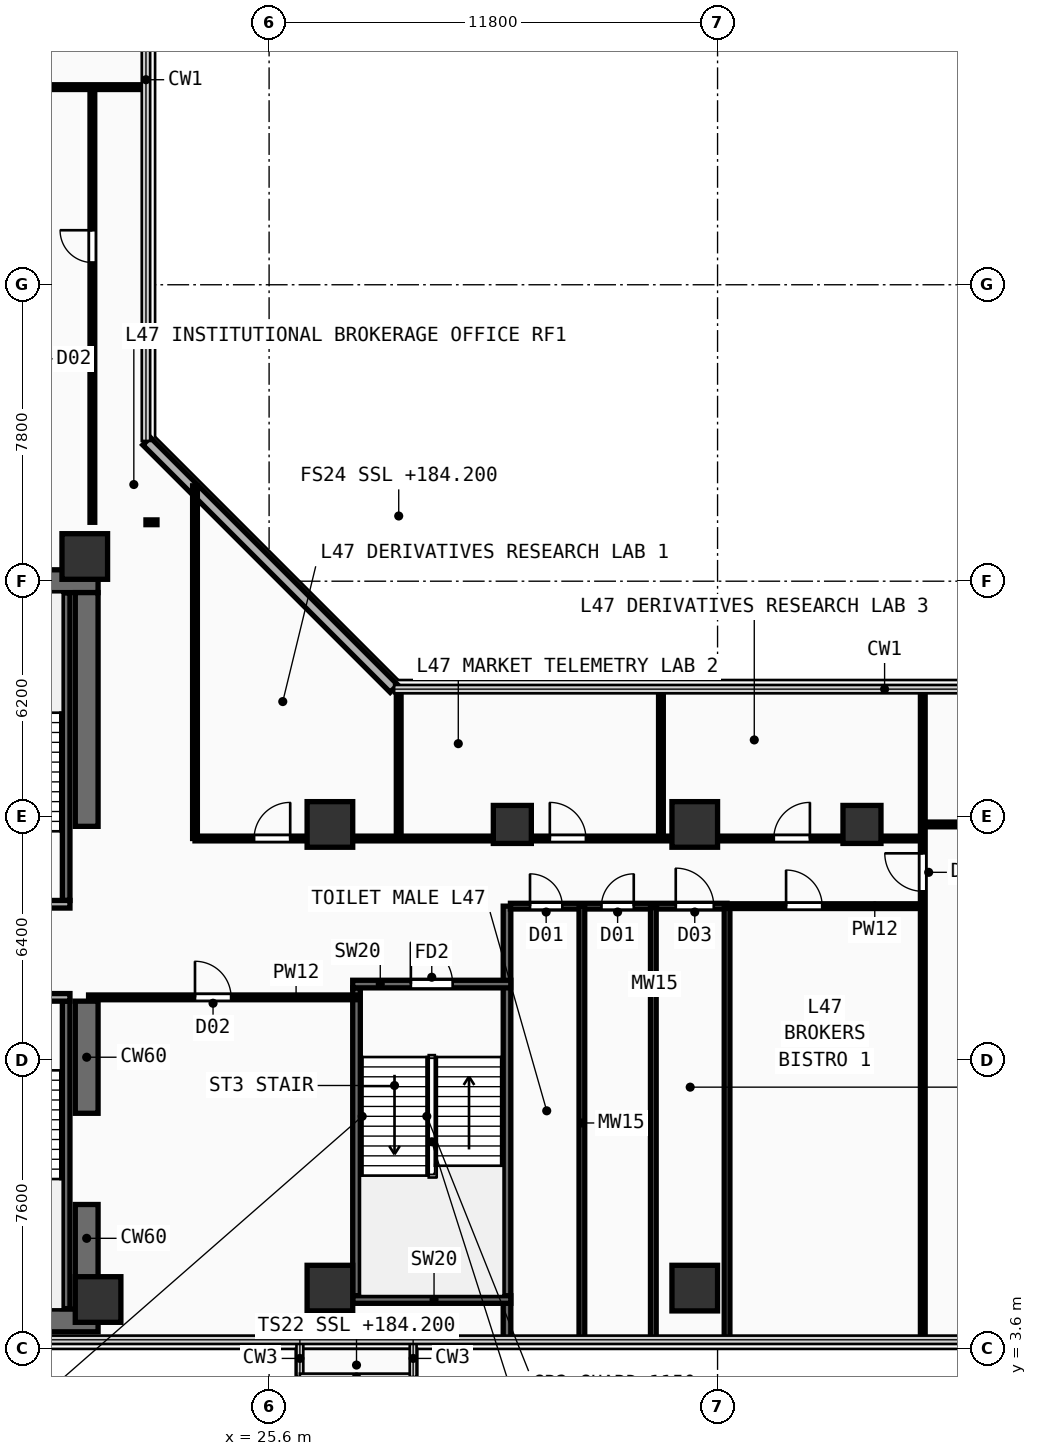
"""IFC4 building model, lengths in metres.
Left out: names, types, materials, properties, quantities, classifications, styles, units other than length and angle.
Written with IfcOpenShell. Run it as: python <this file> out.ifc"""

import sys

from ifc_helpers import new_model, si_unit, direction, frame, frame_2d, origin, origin_2d, place, context, subcontext, project, spatial, rectangle, extrude, element, fill, save


model = new_model("IFC4")
c1 = context("Model", 3, precision=1e-05, world=origin(), true_north=direction((0.0, 1.0)))
c2 = subcontext(c1, "Body", "Model", "MODEL_VIEW")
j1 = project(units=[si_unit("LENGTHUNIT", "METRE"), si_unit("PLANEANGLEUNIT", "RADIAN")], contexts=[c1])
p1 = place(None, origin())
s1 = spatial("IfcSite", under=j1, at=p1, CompositionType="ELEMENT")
p2 = place(p1, origin())
s2 = spatial("IfcBuilding", under=s1, at=p2, CompositionType="ELEMENT")
p3 = place(p2, frame((0.0, 0.0, 184.2)))
s3 = spatial("IfcBuildingStorey", under=s2, at=p3, CompositionType="ELEMENT", Elevation=184.2)
for number, where, z_axis, x_axis in (
    (1, (7.15, 4.35, 0.0), (0.0, 0.0, 1.0), (1.0, 0.0, 0.0)),
    (2, (7.15, 23.8, 0.0), (0.0, 0.0, 1.0), (1.0, 0.0, 0.0)),
):
    element("IfcWall", number, at=place(p3, frame(where, z_axis=z_axis, x_axis=x_axis)), inside=s3, PredefinedType="SHEAR", context=c2, shape_type="SweptSolid", body=[
        extrude(rectangle(XDim=13.95, YDim=0.6, at=frame_2d((6.975, 0.0))), origin(), (0.0, 0.0, 1.0), 3.56),
    ])
p4 = place(p3, frame((20.8, 4.65, 0.0), z_axis=(0.0, 0.0, 1.0), x_axis=(0.0, 1.0, 0.0)))
e3 = element("IfcWall", 3, at=p4, inside=s3, PredefinedType="SHEAR", context=c2, shape_type="SweptSolid", body=[
    extrude(rectangle(XDim=2.75, YDim=0.6, at=frame_2d((1.375, 0.0))), origin(), (0.0, 0.0, 1.0), 3.56),
])
p5 = place(p3, frame((20.8, 9.8, 0.0), z_axis=(0.0, 0.0, 1.0), x_axis=(0.0, 1.0, 0.0)))
e4 = element("IfcWall", 4, at=p5, inside=s3, PredefinedType="SHEAR", context=c2, shape_type="SweptSolid", body=[
    extrude(rectangle(XDim=2.95, YDim=0.6, at=frame_2d((1.475, 0.0))), origin(), (0.0, 0.0, 1.0), 3.56),
])
p6 = place(p3, frame((20.8, 17.35, 0.0), z_axis=(0.0, 0.0, 1.0), x_axis=(0.0, 1.0, 0.0)))
e5 = element("IfcWall", 5, at=p6, inside=s3, PredefinedType="SHEAR", context=c2, shape_type="SweptSolid", body=[
    extrude(rectangle(XDim=6.15, YDim=0.6, at=frame_2d((3.075, 0.0))), origin(), (0.0, 0.0, 1.0), 3.56),
])
for number, where, z_axis, x_axis in (
    (6, (21.1, 4.9, 0.0), (0.0, 0.0, 1.0), (1.0, 0.0, 0.0)),
    (7, (20.75, 24.45, 0.0), (0.0, 0.0, 1.0), (1.0, 0.0, 0.0)),
    (8, (27.2, 5.2, 0.0), (0.0, 0.0, 1.0), (1.0, 0.0, 0.0)),
    (9, (36.8, 5.2, 0.0), (0.0, 0.0, 1.0), (1.0, 0.0, 0.0)),
    (10, (27.2, 17.4, 0.0), (0.0, 0.0, 1.0), (1.0, 0.0, 0.0)),
    (11, (36.8, 17.4, 0.0), (0.0, 0.0, 1.0), (1.0, 0.0, 0.0)),
):
    element("IfcColumn", number, at=place(p3, frame(where, z_axis=z_axis, x_axis=x_axis)), inside=s3, PredefinedType="COLUMN", context=c2, shape_type="SweptSolid", body=[
        extrude(rectangle(XDim=1.2, YDim=1.2, at=origin_2d()), origin(), (0.0, 0.0, 1.0), 3.56),
    ])
for number, where, z_axis, x_axis in (
    (12, (32.0, 17.4, 0.0), (0.0, 0.0, 1.0), (1.0, 0.0, 0.0)),
    (13, (41.2, 17.4, 0.0), (0.0, 0.0, 1.0), (1.0, 0.0, 0.0)),
):
    element("IfcColumn", number, at=place(p3, frame(where, z_axis=z_axis, x_axis=x_axis)), inside=s3, PredefinedType="COLUMN", context=c2, shape_type="SweptSolid", body=[
        extrude(rectangle(XDim=1.0, YDim=1.0, at=origin_2d()), origin(), (0.0, 0.0, 1.0), 3.56),
    ])
p7 = place(p3, frame((28.885, 20.975, 0.0), z_axis=(0.0, 0.0, 1.0), x_axis=(-0.707106781187, 0.707106781187, 0.0)))
e14 = element("IfcWall", 14, at=p7, inside=s3, PredefinedType="SOLIDWALL", context=c2, shape_type="SweptSolid", body=[
    extrude(rectangle(XDim=9.207, YDim=0.28, at=frame_2d((4.603, 0.0))), origin(), (0.0, 0.0, 1.0), 3.56),
])
p8 = place(p3, frame((20.26, 4.66, 0.0), z_axis=(0.0, 0.0, 1.0), x_axis=(0.0, 1.0, 0.0)))
e15 = element("IfcWall", 15, at=p8, inside=s3, PredefinedType="SHEAR", context=c2, shape_type="SweptSolid", body=[
    extrude(rectangle(XDim=8.09, YDim=0.2, at=frame_2d((4.045, 0.0))), origin(), (0.0, 0.0, 1.0), 3.56),
])
p9 = place(p3, frame((16.4, 12.85, 0.0), z_axis=(0.0, 0.0, 1.0), x_axis=(1.0, 0.0, 0.0)))
e16 = element("IfcWall", 16, at=p9, inside=s3, PredefinedType="PARTITIONING", context=c2, shape_type="SweptSolid", body=[
    extrude(rectangle(XDim=3.96, YDim=0.2, at=frame_2d((1.98, 0.0))), origin(), (0.0, 0.0, 1.0), 3.56),
])
p10 = place(p9, frame((1.304, 0.0, 0.0)))
e17 = element("IfcOpeningElement", 17, at=p10, cuts=e16, PredefinedType="OPENING", context=c2, shape_type="SweptSolid", body=[
    extrude(rectangle(XDim=1.1, YDim=2.2, at=frame_2d((0.55, 1.1))), frame((0.0, 0.11, 0.0), z_axis=(0.0, -1.0, 0.0), x_axis=(1.0, 0.0, 0.0)), (0.0, 0.0, 1.0), 0.22),
])
p11 = place(p3, frame((20.26, 15.4, 0.0), z_axis=(0.0, 0.0, 1.0), x_axis=(0.0, 1.0, 0.0)))
e18 = element("IfcWall", 18, at=p11, inside=s3, PredefinedType="SHEAR", context=c2, shape_type="SweptSolid", body=[
    extrude(rectangle(XDim=8.09, YDim=0.2, at=frame_2d((4.045, 0.0))), origin(), (0.0, 0.0, 1.0), 3.56),
])
p12 = place(p3, frame((16.41, 15.3, 0.0), z_axis=(0.0, 0.0, 1.0), x_axis=(1.0, 0.0, 0.0)))
e19 = element("IfcWall", 19, at=p12, inside=s3, PredefinedType="PARTITIONING", context=c2, shape_type="SweptSolid", body=[
    extrude(rectangle(XDim=3.95, YDim=0.2, at=frame_2d((1.975, 0.0))), origin(), (0.0, 0.0, 1.0), 3.56),
])
p13 = place(p12, frame((1.294, 0.0, 0.0)))
e20 = element("IfcOpeningElement", 20, at=p13, cuts=e19, PredefinedType="OPENING", context=c2, shape_type="SweptSolid", body=[
    extrude(rectangle(XDim=1.1, YDim=2.2, at=frame_2d((0.55, 1.1))), frame((0.0, 0.11, 0.0), z_axis=(0.0, -1.0, 0.0), x_axis=(1.0, 0.0, 0.0)), (0.0, 0.0, 1.0), 0.22),
])
p14 = place(p3, frame((27.9, 5.0, 0.0), z_axis=(0.0, 0.0, 1.0), x_axis=(0.0, 1.0, 0.0)))
e21 = element("IfcWall", 21, at=p14, inside=s3, PredefinedType="SHEAR", context=c2, shape_type="SweptSolid", body=[
    extrude(rectangle(XDim=8.1, YDim=0.2, at=frame_2d((4.05, 0.0))), origin(), (0.0, 0.0, 1.0), 3.56),
])
p15 = place(p3, frame((31.86, 3.84, 0.0), z_axis=(0.0, 0.0, 1.0), x_axis=(0.0, 1.0, 0.0)))
e22 = element("IfcWall", 22, at=p15, inside=s3, PredefinedType="SHEAR", context=c2, shape_type="SweptSolid", body=[
    extrude(rectangle(XDim=11.41, YDim=0.2, at=frame_2d((5.705, 0.0))), origin(), (0.0, 0.0, 1.0), 3.56),
])
p16 = place(p3, frame((27.8, 4.9, 0.0), z_axis=(0.0, 0.0, 1.0), x_axis=(1.0, 0.0, 0.0)))
e23 = element("IfcWall", 23, at=p16, inside=s3, PredefinedType="SHEAR", context=c2, shape_type="SweptSolid", body=[
    extrude(rectangle(XDim=4.16, YDim=0.2, at=frame_2d((2.08, 0.0))), origin(), (0.0, 0.0, 1.0), 3.56),
])
p17 = place(p3, frame((27.8, 13.2, 0.0), z_axis=(0.0, 0.0, 1.0), x_axis=(1.0, 0.0, 0.0)))
e24 = element("IfcWall", 24, at=p17, inside=s3, PredefinedType="SHEAR", context=c2, shape_type="SweptSolid", body=[
    extrude(rectangle(XDim=4.16, YDim=0.2, at=frame_2d((2.08, 0.0))), origin(), (0.0, 0.0, 1.0), 3.56),
])
p18 = place(p17, frame((1.53, 0.0, 0.0)))
e25 = element("IfcOpeningElement", 25, at=p18, cuts=e24, PredefinedType="OPENING", context=c2, shape_type="SweptSolid", body=[
    extrude(rectangle(XDim=1.1, YDim=2.2, at=frame_2d((0.55, 1.1))), frame((0.0, 0.11, 0.0), z_axis=(0.0, -1.0, 0.0), x_axis=(1.0, 0.0, 0.0)), (0.0, 0.0, 1.0), 0.22),
])
p19 = place(p3, frame((31.95, 15.25, 0.0), z_axis=(0.0, 0.0, 1.0), x_axis=(1.0, 0.0, 0.0)))
e26 = element("IfcWall", 26, at=p19, inside=s3, PredefinedType="PLUMBINGWALL", context=c2, shape_type="SweptSolid", body=[
    extrude(rectangle(XDim=5.7, YDim=0.15, at=frame_2d((2.85, 0.0))), origin(), (0.0, 0.0, 1.0), 3.16),
])
p20 = place(p19, frame((0.515, 0.0, 0.0)))
e27 = element("IfcOpeningElement", 27, at=p20, cuts=e26, PredefinedType="OPENING", context=c2, shape_type="SweptSolid", body=[
    extrude(rectangle(XDim=0.85, YDim=2.15, at=frame_2d((0.425, 1.075))), frame((0.0, 0.085, 0.0), z_axis=(0.0, -1.0, 0.0), x_axis=(1.0, 0.0, 0.0)), (0.0, 0.0, 1.0), 0.17),
])
p21 = place(p19, frame((2.395, 0.0, 0.0)))
e28 = element("IfcOpeningElement", 28, at=p21, cuts=e26, PredefinedType="OPENING", context=c2, shape_type="SweptSolid", body=[
    extrude(rectangle(XDim=0.85, YDim=2.15, at=frame_2d((0.425, 1.075))), frame((0.0, 0.085, 0.0), z_axis=(0.0, -1.0, 0.0), x_axis=(1.0, 0.0, 0.0)), (0.0, 0.0, 1.0), 0.17),
])
p22 = place(p19, frame((4.35, 0.0, 0.0)))
e29 = element("IfcOpeningElement", 29, at=p22, cuts=e26, PredefinedType="OPENING", context=c2, shape_type="SweptSolid", body=[
    extrude(rectangle(XDim=1.0, YDim=2.2, at=frame_2d((0.5, 1.1))), frame((0.0, 0.085, 0.0), z_axis=(0.0, -1.0, 0.0), x_axis=(1.0, 0.0, 0.0)), (0.0, 0.0, 1.0), 0.17),
])
for number, where, z_axis, x_axis in (
    (30, (33.83, 3.84, 0.0), (0.0, 0.0, 1.0), (0.0, 1.0, 0.0)),
    (31, (35.71, 3.84, 0.0), (0.0, 0.0, 1.0), (0.0, 1.0, 0.0)),
    (32, (37.65, 3.84, 0.0), (0.0, 0.0, 1.0), (0.0, 1.0, 0.0)),
):
    element("IfcWall", number, at=place(p3, frame(where, z_axis=z_axis, x_axis=x_axis)), inside=s3, PredefinedType="PLUMBINGWALL", context=c2, shape_type="SweptSolid", body=[
        extrude(rectangle(XDim=11.41, YDim=0.15, at=frame_2d((5.705, 0.0))), origin(), (0.0, 0.0, 1.0), 3.56),
    ])
p23 = place(p3, frame((20.85, 12.85, 0.0), z_axis=(0.0, 0.0, 1.0), x_axis=(1.0, 0.0, 0.0)))
e33 = element("IfcWall", 33, at=p23, inside=s3, PredefinedType="PARTITIONING", context=c2, shape_type="SweptSolid", body=[
    extrude(rectangle(XDim=7.05, YDim=0.125, at=frame_2d((3.525, 0.0))), origin(), (0.0, 0.0, 1.0), 3.56),
])
p24 = place(p23, frame((2.8, 0.0, 0.0)))
e34 = element("IfcOpeningElement", 34, at=p24, cuts=e33, PredefinedType="OPENING", context=c2, shape_type="SweptSolid", body=[
    extrude(rectangle(XDim=0.95, YDim=2.15, at=frame_2d((0.475, 1.075))), frame((0.0, 0.073, 0.0), z_axis=(0.0, -1.0, 0.0), x_axis=(1.0, 0.0, 0.0)), (0.0, 0.0, 1.0), 0.145),
])
p25 = place(p3, frame((20.95, 25.35, 0.0), z_axis=(0.0, 0.0, 1.0), x_axis=(0.0, 1.0, 0.0)))
e35 = element("IfcWall", 35, at=p25, inside=s3, PredefinedType="PARTITIONING", context=c2, shape_type="SweptSolid", body=[
    extrude(rectangle(XDim=11.45, YDim=0.125, at=frame_2d((5.725, 0.0))), origin(), (0.0, 0.0, 1.0), 3.56),
])
p26 = place(p25, frame((6.835, 0.0, 0.0)))
e36 = element("IfcOpeningElement", 36, at=p26, cuts=e35, PredefinedType="OPENING", context=c2, shape_type="SweptSolid", body=[
    extrude(rectangle(XDim=0.85, YDim=2.15, at=frame_2d((0.425, 1.075))), frame((0.0, 0.073, 0.0), z_axis=(0.0, -1.0, 0.0), x_axis=(1.0, 0.0, 0.0)), (0.0, 0.0, 1.0), 0.145),
])
p27 = place(p3, frame((22.65, 25.35, 0.0), z_axis=(0.0, 0.0, 1.0), x_axis=(-1.0, 0.0, 0.0)))
e37 = element("IfcWall", 37, at=p27, inside=s3, PredefinedType="PARTITIONING", context=c2, shape_type="SweptSolid", body=[
    extrude(rectangle(XDim=0.29, YDim=0.125, at=frame_2d((0.145, 0.0))), origin(), (0.0, 0.0, 1.0), 3.56),
])
p28 = place(p3, frame((11.98, 36.8, 0.0), z_axis=(0.0, 0.0, 1.0), x_axis=(1.0, 0.0, 0.0)))
e38 = element("IfcWall", 38, at=p28, inside=s3, PredefinedType="PARTITIONING", context=c2, shape_type="SweptSolid", body=[
    extrude(rectangle(XDim=10.38, YDim=0.125, at=frame_2d((5.19, 0.0))), origin(), (0.0, 0.0, 1.0), 3.56),
])
p29 = place(p3, frame((37.65, 15.25, 0.0), z_axis=(0.0, 0.0, 1.0), x_axis=(1.0, 0.0, 0.0)))
e39 = element("IfcWall", 39, at=p29, inside=s3, PredefinedType="PARTITIONING", context=c2, shape_type="SweptSolid", body=[
    extrude(rectangle(XDim=5.15, YDim=0.125, at=frame_2d((2.575, 0.0))), origin(), (0.0, 0.0, 1.0), 3.16),
])
p30 = place(p29, frame((1.553, 0.0, 0.0)))
e40 = element("IfcOpeningElement", 40, at=p30, cuts=e39, PredefinedType="OPENING", context=c2, shape_type="SweptSolid", body=[
    extrude(rectangle(XDim=0.95, YDim=2.15, at=frame_2d((0.475, 1.075))), frame((0.0, 0.073, 0.0), z_axis=(0.0, -1.0, 0.0), x_axis=(1.0, 0.0, 0.0)), (0.0, 0.0, 1.0), 0.145),
])
p31 = place(p3, frame((42.8, 3.84, 0.0), z_axis=(0.0, 0.0, 1.0), x_axis=(0.0, 1.0, 0.0)))
e41 = element("IfcWall", 41, at=p31, inside=s3, PredefinedType="PARTITIONING", context=c2, shape_type="SweptSolid", body=[
    extrude(rectangle(XDim=17.12, YDim=0.125, at=frame_2d((8.56, 0.0))), origin(), (0.0, 0.0, 1.0), 3.56),
])
p32 = place(p31, frame((11.8, 0.0, 0.0)))
e42 = element("IfcOpeningElement", 42, at=p32, cuts=e41, PredefinedType="OPENING", context=c2, shape_type="SweptSolid", body=[
    extrude(rectangle(XDim=1.0, YDim=2.2, at=frame_2d((0.5, 1.1))), frame((0.0, 0.073, 0.0), z_axis=(0.0, -1.0, 0.0), x_axis=(1.0, 0.0, 0.0)), (0.0, 0.0, 1.0), 0.145),
])
p33 = place(p3, frame((42.8, 17.4, 0.0), z_axis=(0.0, 0.0, 1.0), x_axis=(1.0, 0.0, 0.0)))
e43 = element("IfcWall", 43, at=p33, inside=s3, PredefinedType="PARTITIONING", context=c2, shape_type="SweptSolid", body=[
    extrude(rectangle(XDim=14.76, YDim=0.125, at=frame_2d((7.38, 0.0))), origin(), (0.0, 0.0, 1.0), 3.2),
])
p34 = place(p33, frame((3.812, 0.0, 0.0)))
e44 = element("IfcOpeningElement", 44, at=p34, cuts=e43, PredefinedType="OPENING", context=c2, shape_type="SweptSolid", body=[
    extrude(rectangle(XDim=0.95, YDim=2.15, at=frame_2d((0.475, 1.075))), frame((0.0, 0.073, 0.0), z_axis=(0.0, -1.0, 0.0), x_axis=(1.0, 0.0, 0.0)), (0.0, 0.0, 1.0), 0.145),
])
p35 = place(p3, frame((23.65, 17.03, 0.0), z_axis=(0.0, 0.0, 1.0), x_axis=(0.0, 1.0, 0.0)))
e45 = element("IfcWall", 45, at=p35, inside=s3, PredefinedType="PARTITIONING", context=c2, shape_type="SweptSolid", body=[
    extrude(rectangle(XDim=9.28, YDim=0.125, at=frame_2d((4.64, 0.0))), origin(), (0.0, 0.0, 1.0), 3.56),
])
p36 = place(p3, frame((23.65, 17.03, 0.0), z_axis=(0.0, 0.0, 1.0), x_axis=(1.0, 0.0, 0.0)))
e46 = element("IfcWall", 46, at=p36, inside=s3, PredefinedType="PARTITIONING", context=c2, shape_type="SweptSolid", body=[
    extrude(rectangle(XDim=19.15, YDim=0.125, at=frame_2d((9.575, 0.0))), origin(), (0.0, 0.0, 1.0), 3.2),
])
p37 = place(p36, frame((1.555, 0.0, 0.0)))
e47 = element("IfcOpeningElement", 47, at=p37, cuts=e46, PredefinedType="OPENING", context=c2, shape_type="SweptSolid", body=[
    extrude(rectangle(XDim=0.95, YDim=2.15, at=frame_2d((0.475, 1.075))), frame((0.0, 0.073, 0.0), z_axis=(0.0, -1.0, 0.0), x_axis=(1.0, 0.0, 0.0)), (0.0, 0.0, 1.0), 0.145),
])
p38 = place(p36, frame((9.336, 0.0, 0.0)))
e48 = element("IfcOpeningElement", 48, at=p38, cuts=e46, PredefinedType="OPENING", context=c2, shape_type="SweptSolid", body=[
    extrude(rectangle(XDim=0.95, YDim=2.15, at=frame_2d((0.475, 1.075))), frame((0.0, 0.073, 0.0), z_axis=(0.0, -1.0, 0.0), x_axis=(1.0, 0.0, 0.0)), (0.0, 0.0, 1.0), 0.145),
])
p39 = place(p36, frame((15.23, 0.0, 0.0)))
e49 = element("IfcOpeningElement", 49, at=p39, cuts=e46, PredefinedType="OPENING", context=c2, shape_type="SweptSolid", body=[
    extrude(rectangle(XDim=0.95, YDim=2.15, at=frame_2d((0.475, 1.075))), frame((0.0, 0.073, 0.0), z_axis=(0.0, -1.0, 0.0), x_axis=(1.0, 0.0, 0.0)), (0.0, 0.0, 1.0), 0.145),
])
for number, where, z_axis, x_axis in (
    (50, (29.01, 17.03, 0.0), (0.0, 0.0, 1.0), (0.0, 1.0, 0.0)),
    (51, (35.91, 17.03, 0.0), (0.0, 0.0, 1.0), (0.0, 1.0, 0.0)),
):
    element("IfcWall", number, at=place(p3, frame(where, z_axis=z_axis, x_axis=x_axis)), inside=s3, PredefinedType="PARTITIONING", context=c2, shape_type="SweptSolid", body=[
        extrude(rectangle(XDim=3.93, YDim=0.125, at=frame_2d((1.965, 0.0))), origin(), (0.0, 0.0, 1.0), 3.56),
    ])
p40 = place(p18, frame((1.1, 0.0, 0.0), z_axis=(0.0, 0.0, 1.0), x_axis=(-1.0, 0.0, 0.0)))
e52 = element("IfcDoor", 52, at=p40, inside=s3, OperationType="SINGLE_SWING_RIGHT", PredefinedType="DOOR", context=c2, shape_type="SweptSolid", body=[
    extrude(rectangle(XDim=1.1, YDim=2.2, at=frame_2d((0.55, 1.1))), frame((0.0, 0.025, 0.0), z_axis=(0.0, -1.0, 0.0), x_axis=(1.0, 0.0, 0.0)), (0.0, 0.0, 1.0), 0.05),
])
fill(e25, e52)
p41 = place(p20, origin())
e53 = element("IfcDoor", 53, at=p41, inside=s3, OperationType="SINGLE_SWING_LEFT", PredefinedType="DOOR", context=c2, shape_type="SweptSolid", body=[
    extrude(rectangle(XDim=0.85, YDim=2.15, at=frame_2d((0.425, 1.075))), frame((0.0, 0.025, 0.0), z_axis=(0.0, -1.0, 0.0), x_axis=(1.0, 0.0, 0.0)), (0.0, 0.0, 1.0), 0.05),
])
fill(e27, e53)
p42 = place(p21, origin())
e54 = element("IfcDoor", 54, at=p42, inside=s3, OperationType="SINGLE_SWING_RIGHT", PredefinedType="DOOR", context=c2, shape_type="SweptSolid", body=[
    extrude(rectangle(XDim=0.85, YDim=2.15, at=frame_2d((0.425, 1.075))), frame((0.0, 0.025, 0.0), z_axis=(0.0, -1.0, 0.0), x_axis=(1.0, 0.0, 0.0)), (0.0, 0.0, 1.0), 0.05),
])
fill(e28, e54)
p43 = place(p22, origin())
e55 = element("IfcDoor", 55, at=p43, inside=s3, OperationType="SINGLE_SWING_LEFT", PredefinedType="DOOR", context=c2, shape_type="SweptSolid", body=[
    extrude(rectangle(XDim=1.0, YDim=2.2, at=frame_2d((0.5, 1.1))), frame((0.0, 0.025, 0.0), z_axis=(0.0, -1.0, 0.0), x_axis=(1.0, 0.0, 0.0)), (0.0, 0.0, 1.0), 0.05),
])
fill(e29, e55)
p44 = place(p24, origin())
e56 = element("IfcDoor", 56, at=p44, inside=s3, OperationType="SINGLE_SWING_LEFT", PredefinedType="DOOR", context=c2, shape_type="SweptSolid", body=[
    extrude(rectangle(XDim=0.95, YDim=2.15, at=frame_2d((0.475, 1.075))), frame((0.0, 0.025, 0.0), z_axis=(0.0, -1.0, 0.0), x_axis=(1.0, 0.0, 0.0)), (0.0, 0.0, 1.0), 0.05),
])
fill(e34, e56)
p45 = place(p26, origin())
e57 = element("IfcDoor", 57, at=p45, inside=s3, OperationType="SINGLE_SWING_RIGHT", PredefinedType="DOOR", context=c2, shape_type="SweptSolid", body=[
    extrude(rectangle(XDim=0.85, YDim=2.15, at=frame_2d((0.425, 1.075))), frame((0.0, 0.025, 0.0), z_axis=(0.0, -1.0, 0.0), x_axis=(1.0, 0.0, 0.0)), (0.0, 0.0, 1.0), 0.05),
])
fill(e36, e57)
p46 = place(p30, origin())
e58 = element("IfcDoor", 58, at=p46, inside=s3, OperationType="SINGLE_SWING_LEFT", PredefinedType="DOOR", context=c2, shape_type="SweptSolid", body=[
    extrude(rectangle(XDim=0.95, YDim=2.15, at=frame_2d((0.475, 1.075))), frame((0.0, 0.025, 0.0), z_axis=(0.0, -1.0, 0.0), x_axis=(1.0, 0.0, 0.0)), (0.0, 0.0, 1.0), 0.05),
])
fill(e40, e58)
p47 = place(p32, origin())
e59 = element("IfcDoor", 59, at=p47, inside=s3, OperationType="SINGLE_SWING_RIGHT", PredefinedType="DOOR", context=c2, shape_type="SweptSolid", body=[
    extrude(rectangle(XDim=1.0, YDim=2.2, at=frame_2d((0.5, 1.1))), frame((0.0, 0.025, 0.0), z_axis=(0.0, -1.0, 0.0), x_axis=(1.0, 0.0, 0.0)), (0.0, 0.0, 1.0), 0.05),
])
fill(e42, e59)
p48 = place(p37, origin())
e60 = element("IfcDoor", 60, at=p48, inside=s3, OperationType="SINGLE_SWING_RIGHT", PredefinedType="DOOR", context=c2, shape_type="SweptSolid", body=[
    extrude(rectangle(XDim=0.95, YDim=2.15, at=frame_2d((0.475, 1.075))), frame((0.0, 0.025, 0.0), z_axis=(0.0, -1.0, 0.0), x_axis=(1.0, 0.0, 0.0)), (0.0, 0.0, 1.0), 0.05),
])
fill(e47, e60)
p49 = place(p38, origin())
e61 = element("IfcDoor", 61, at=p49, inside=s3, OperationType="SINGLE_SWING_LEFT", PredefinedType="DOOR", context=c2, shape_type="SweptSolid", body=[
    extrude(rectangle(XDim=0.95, YDim=2.15, at=frame_2d((0.475, 1.075))), frame((0.0, 0.025, 0.0), z_axis=(0.0, -1.0, 0.0), x_axis=(1.0, 0.0, 0.0)), (0.0, 0.0, 1.0), 0.05),
])
fill(e48, e61)
p50 = place(p39, origin())
e62 = element("IfcDoor", 62, at=p50, inside=s3, OperationType="SINGLE_SWING_RIGHT", PredefinedType="DOOR", context=c2, shape_type="SweptSolid", body=[
    extrude(rectangle(XDim=0.95, YDim=2.15, at=frame_2d((0.475, 1.075))), frame((0.0, 0.025, 0.0), z_axis=(0.0, -1.0, 0.0), x_axis=(1.0, 0.0, 0.0)), (0.0, 0.0, 1.0), 0.05),
])
fill(e49, e62)
save(model, sys.argv[1])
